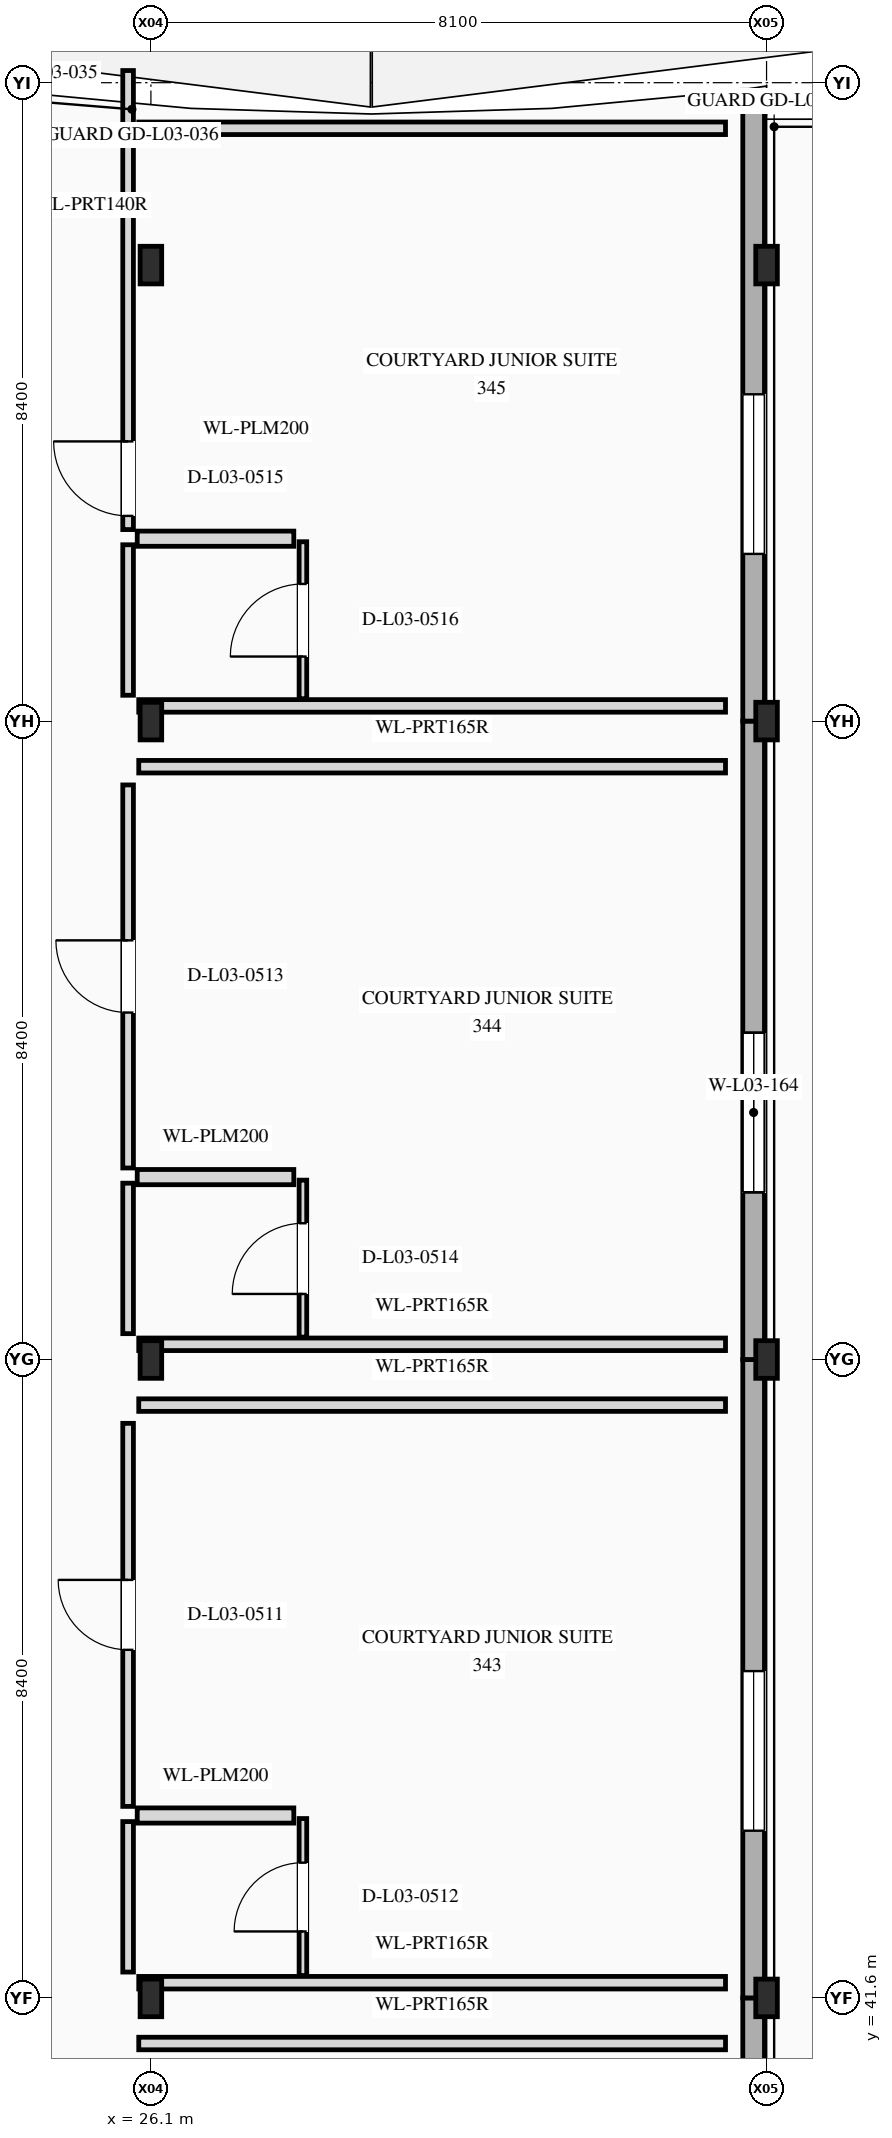
"""IFC4 building model, lengths in metres.
Left out: names, types, materials, properties, quantities, classifications, styles, units other than length and angle.
Written with IfcOpenShell. Run it as: python <this file> out.ifc"""

import sys

from ifc_helpers import new_model, si_unit, direction, frame, frame_2d, origin, origin_2d, place, context, subcontext, project, spatial, rectangle, i_section, extrude, element, fill, save


model = new_model("IFC4")
c1 = context("Model", 3, precision=1e-05, world=origin(), true_north=direction((0.0, 1.0)))
c2 = subcontext(c1, "Body", "Model", "MODEL_VIEW")
j1 = project(units=[si_unit("LENGTHUNIT", "METRE"), si_unit("PLANEANGLEUNIT", "RADIAN")], contexts=[c1])
p1 = place(None, origin())
s1 = spatial("IfcSite", under=j1, at=p1, CompositionType="ELEMENT")
p2 = place(p1, origin())
s2 = spatial("IfcBuilding", under=s1, at=p2, CompositionType="ELEMENT")
p3 = place(p2, frame((0.0, 0.0, 15.6)))
s3 = spatial("IfcBuildingStorey", under=s2, at=p3, CompositionType="ELEMENT", Elevation=15.6)
for number, where, z_axis, x_axis in (
    (1, (26.1, 41.6, -0.3), (0.0, 0.0, 1.0), (1.0, 0.0, 0.0)),
    (2, (34.2, 41.6, -0.3), (0.0, 0.0, 1.0), (1.0, 0.0, 0.0)),
    (3, (26.1, 50.0, -0.3), (0.0, 0.0, 1.0), (1.0, 0.0, 0.0)),
    (4, (34.2, 50.0, -0.3), (0.0, 0.0, 1.0), (1.0, 0.0, 0.0)),
    (5, (26.1, 58.4, -0.3), (0.0, 0.0, 1.0), (1.0, 0.0, 0.0)),
    (6, (34.2, 58.4, -0.3), (0.0, 0.0, 1.0), (1.0, 0.0, 0.0)),
    (7, (26.1, 64.4, -0.3), (0.0, 0.0, 1.0), (1.0, 0.0, 0.0)),
    (8, (34.2, 64.4, -0.3), (0.0, 0.0, 1.0), (1.0, 0.0, 0.0)),
):
    element("IfcColumn", number, at=place(p3, frame(where, z_axis=z_axis, x_axis=x_axis)), inside=s3, PredefinedType="COLUMN", context=c2, shape_type="SweptSolid", body=[
        extrude(i_section(OverallWidth=0.284, OverallDepth=0.495, WebThickness=0.019, FlangeThickness=0.033, at=origin_2d()), origin(), (0.0, 0.0, 1.0), 3.925),
    ])
p4 = place(p3, frame((34.03, 32.8, 0.0), z_axis=(0.0, 0.0, 1.0), x_axis=(0.0, 1.0, 0.0)))
e9 = element("IfcWall", 9, at=p4, inside=s3, PredefinedType="STANDARD", context=c2, shape_type="SweptSolid", body=[
    extrude(rectangle(XDim=8.8, YDim=0.285, at=frame_2d((4.4, 0.0))), origin(), (0.0, 0.0, 1.0), 3.9),
])
p5 = place(p4, frame((2.2, 0.0, 0.88)))
e10 = element("IfcOpeningElement", 10, at=p5, cuts=e9, PredefinedType="OPENING", context=c2, shape_type="SweptSolid", body=[
    extrude(rectangle(XDim=2.1, YDim=1.9, at=frame_2d((1.05, 0.95))), frame((0.0, 0.152, 0.0), z_axis=(0.0, -1.0, 0.0), x_axis=(1.0, 0.0, 0.0)), (0.0, 0.0, 1.0), 0.305),
])
p6 = place(p3, frame((34.03, 41.6, 0.0), z_axis=(0.0, 0.0, 1.0), x_axis=(0.0, 1.0, 0.0)))
e11 = element("IfcWall", 11, at=p6, inside=s3, PredefinedType="STANDARD", context=c2, shape_type="SweptSolid", body=[
    extrude(rectangle(XDim=8.4, YDim=0.285, at=frame_2d((4.2, 0.0))), origin(), (0.0, 0.0, 1.0), 3.9),
])
p7 = place(p6, frame((2.2, 0.0, 0.88)))
e12 = element("IfcOpeningElement", 12, at=p7, cuts=e11, PredefinedType="OPENING", context=c2, shape_type="SweptSolid", body=[
    extrude(rectangle(XDim=2.1, YDim=1.9, at=frame_2d((1.05, 0.95))), frame((0.0, 0.152, 0.0), z_axis=(0.0, -1.0, 0.0), x_axis=(1.0, 0.0, 0.0)), (0.0, 0.0, 1.0), 0.305),
])
p8 = place(p3, frame((34.03, 50.0, 0.0), z_axis=(0.0, 0.0, 1.0), x_axis=(0.0, 1.0, 0.0)))
e13 = element("IfcWall", 13, at=p8, inside=s3, PredefinedType="STANDARD", context=c2, shape_type="SweptSolid", body=[
    extrude(rectangle(XDim=8.4, YDim=0.285, at=frame_2d((4.2, 0.0))), origin(), (0.0, 0.0, 1.0), 3.9),
])
p9 = place(p8, frame((2.2, 0.0, 0.88)))
e14 = element("IfcOpeningElement", 14, at=p9, cuts=e13, PredefinedType="OPENING", context=c2, shape_type="SweptSolid", body=[
    extrude(rectangle(XDim=2.1, YDim=1.9, at=frame_2d((1.05, 0.95))), frame((0.0, 0.152, 0.0), z_axis=(0.0, -1.0, 0.0), x_axis=(1.0, 0.0, 0.0)), (0.0, 0.0, 1.0), 0.305),
])
p10 = place(p3, frame((34.03, 58.4, 0.0), z_axis=(0.0, 0.0, 1.0), x_axis=(0.0, 1.0, 0.0)))
e15 = element("IfcWall", 15, at=p10, inside=s3, PredefinedType="STANDARD", context=c2, shape_type="SweptSolid", body=[
    extrude(rectangle(XDim=8.3, YDim=0.285, at=frame_2d((4.15, 0.0))), origin(), (0.0, 0.0, 1.0), 3.9),
])
p11 = place(p10, frame((2.2, 0.0, 0.88)))
e16 = element("IfcOpeningElement", 16, at=p11, cuts=e15, PredefinedType="OPENING", context=c2, shape_type="SweptSolid", body=[
    extrude(rectangle(XDim=2.1, YDim=1.9, at=frame_2d((1.05, 0.95))), frame((0.0, 0.152, 0.0), z_axis=(0.0, -1.0, 0.0), x_axis=(1.0, 0.0, 0.0)), (0.0, 0.0, 1.0), 0.305),
])
p12 = place(p3, frame((25.94, 41.0, 0.0), z_axis=(0.0, 0.0, 1.0), x_axis=(1.0, 0.0, 0.0)))
e17 = element("IfcWall", 17, at=p12, inside=s3, PredefinedType="PARTITIONING", context=c2, shape_type="SweptSolid", body=[
    extrude(rectangle(XDim=7.72, YDim=0.165, at=frame_2d((3.86, 0.0))), origin(), (0.0, 0.0, 1.0), 3.074),
])
p13 = place(p3, frame((25.8, 41.94, 0.0), z_axis=(0.0, 0.0, 1.0), x_axis=(0.0, 1.0, 0.0)))
e18 = element("IfcWall", 18, at=p13, inside=s3, PredefinedType="PARTITIONING", context=c2, shape_type="SweptSolid", body=[
    extrude(rectangle(XDim=1.98, YDim=0.14, at=frame_2d((0.99, 0.0))), origin(), (0.0, 0.0, 1.0), 3.6),
])
p14 = place(p3, frame((25.8, 44.12, 0.0), z_axis=(0.0, 0.0, 1.0), x_axis=(0.0, 1.0, 0.0)))
e19 = element("IfcWall", 19, at=p14, inside=s3, PredefinedType="PARTITIONING", context=c2, shape_type="SweptSolid", body=[
    extrude(rectangle(XDim=5.04, YDim=0.14, at=frame_2d((2.52, 0.0))), origin(), (0.0, 0.0, 1.0), 3.074),
])
p15 = place(p14, frame((2.06, 0.0, 0.0)))
e20 = element("IfcOpeningElement", 20, at=p15, cuts=e19, PredefinedType="OPENING", context=c2, shape_type="SweptSolid", body=[
    extrude(rectangle(XDim=0.92, YDim=2.15, at=frame_2d((0.46, 1.075))), frame((0.0, 0.08, 0.0), z_axis=(0.0, -1.0, 0.0), x_axis=(1.0, 0.0, 0.0)), (0.0, 0.0, 1.0), 0.16),
])
p16 = place(p3, frame((25.94, 41.8, 0.0), z_axis=(0.0, 0.0, 1.0), x_axis=(1.0, 0.0, 0.0)))
e21 = element("IfcWall", 21, at=p16, inside=s3, PredefinedType="PARTITIONING", context=c2, shape_type="SweptSolid", body=[
    extrude(rectangle(XDim=7.72, YDim=0.165, at=frame_2d((3.86, 0.0))), origin(), (0.0, 0.0, 1.0), 2.584),
])
p17 = place(p3, frame((25.94, 49.4, 0.0), z_axis=(0.0, 0.0, 1.0), x_axis=(1.0, 0.0, 0.0)))
e22 = element("IfcWall", 22, at=p17, inside=s3, PredefinedType="PARTITIONING", context=c2, shape_type="SweptSolid", body=[
    extrude(rectangle(XDim=7.72, YDim=0.165, at=frame_2d((3.86, 0.0))), origin(), (0.0, 0.0, 1.0), 3.074),
])
p18 = place(p3, frame((25.92, 44.0, 0.0), z_axis=(0.0, 0.0, 1.0), x_axis=(1.0, 0.0, 0.0)))
e23 = element("IfcWall", 23, at=p18, inside=s3, PredefinedType="PLUMBINGWALL", context=c2, shape_type="SweptSolid", body=[
    extrude(rectangle(XDim=2.06, YDim=0.2, at=frame_2d((1.03, 0.0))), origin(), (0.0, 0.0, 1.0), 3.074),
])
p19 = place(p3, frame((28.1, 41.895, 0.0), z_axis=(0.0, 0.0, 1.0), x_axis=(0.0, 1.0, 0.0)))
e24 = element("IfcWall", 24, at=p19, inside=s3, PredefinedType="PARTITIONING", context=c2, shape_type="SweptSolid", body=[
    extrude(rectangle(XDim=2.065, YDim=0.1, at=frame_2d((1.033, 0.0))), origin(), (0.0, 0.0, 1.0), 3.6),
])
p20 = place(p19, frame((0.58, 0.0, 0.0)))
e25 = element("IfcOpeningElement", 25, at=p20, cuts=e24, PredefinedType="OPENING", context=c2, shape_type="SweptSolid", body=[
    extrude(rectangle(XDim=0.905, YDim=2.18, at=frame_2d((0.453, 1.09))), frame((0.0, 0.06, 0.0), z_axis=(0.0, -1.0, 0.0), x_axis=(1.0, 0.0, 0.0)), (0.0, 0.0, 1.0), 0.12),
])
p21 = place(p3, frame((25.8, 50.34, 0.0), z_axis=(0.0, 0.0, 1.0), x_axis=(0.0, 1.0, 0.0)))
e26 = element("IfcWall", 26, at=p21, inside=s3, PredefinedType="PARTITIONING", context=c2, shape_type="SweptSolid", body=[
    extrude(rectangle(XDim=1.98, YDim=0.14, at=frame_2d((0.99, 0.0))), origin(), (0.0, 0.0, 1.0), 3.6),
])
p22 = place(p3, frame((25.8, 52.52, 0.0), z_axis=(0.0, 0.0, 1.0), x_axis=(0.0, 1.0, 0.0)))
e27 = element("IfcWall", 27, at=p22, inside=s3, PredefinedType="PARTITIONING", context=c2, shape_type="SweptSolid", body=[
    extrude(rectangle(XDim=5.04, YDim=0.14, at=frame_2d((2.52, 0.0))), origin(), (0.0, 0.0, 1.0), 3.074),
])
p23 = place(p22, frame((2.045, 0.0, 0.0)))
e28 = element("IfcOpeningElement", 28, at=p23, cuts=e27, PredefinedType="OPENING", context=c2, shape_type="SweptSolid", body=[
    extrude(rectangle(XDim=0.95, YDim=2.15, at=frame_2d((0.475, 1.075))), frame((0.0, 0.08, 0.0), z_axis=(0.0, -1.0, 0.0), x_axis=(1.0, 0.0, 0.0)), (0.0, 0.0, 1.0), 0.16),
])
p24 = place(p3, frame((25.94, 50.2, 0.0), z_axis=(0.0, 0.0, 1.0), x_axis=(1.0, 0.0, 0.0)))
e29 = element("IfcWall", 29, at=p24, inside=s3, PredefinedType="PARTITIONING", context=c2, shape_type="SweptSolid", body=[
    extrude(rectangle(XDim=7.72, YDim=0.165, at=frame_2d((3.86, 0.0))), origin(), (0.0, 0.0, 1.0), 2.584),
])
p25 = place(p3, frame((25.94, 57.8, 0.0), z_axis=(0.0, 0.0, 1.0), x_axis=(1.0, 0.0, 0.0)))
e30 = element("IfcWall", 30, at=p25, inside=s3, PredefinedType="PARTITIONING", context=c2, shape_type="SweptSolid", body=[
    extrude(rectangle(XDim=7.72, YDim=0.165, at=frame_2d((3.86, 0.0))), origin(), (0.0, 0.0, 1.0), 3.074),
])
p26 = place(p3, frame((25.92, 52.4, 0.0), z_axis=(0.0, 0.0, 1.0), x_axis=(1.0, 0.0, 0.0)))
e31 = element("IfcWall", 31, at=p26, inside=s3, PredefinedType="PLUMBINGWALL", context=c2, shape_type="SweptSolid", body=[
    extrude(rectangle(XDim=2.06, YDim=0.2, at=frame_2d((1.03, 0.0))), origin(), (0.0, 0.0, 1.0), 3.074),
])
p27 = place(p3, frame((28.1, 50.294, 0.0), z_axis=(0.0, 0.0, 1.0), x_axis=(0.0, 1.0, 0.0)))
e32 = element("IfcWall", 32, at=p27, inside=s3, PredefinedType="PARTITIONING", context=c2, shape_type="SweptSolid", body=[
    extrude(rectangle(XDim=2.066, YDim=0.1, at=frame_2d((1.033, 0.0))), origin(), (0.0, 0.0, 1.0), 3.6),
])
p28 = place(p27, frame((0.568, 0.0, 0.0)))
e33 = element("IfcOpeningElement", 33, at=p28, cuts=e32, PredefinedType="OPENING", context=c2, shape_type="SweptSolid", body=[
    extrude(rectangle(XDim=0.93, YDim=2.22, at=frame_2d((0.465, 1.11))), frame((0.0, 0.06, 0.0), z_axis=(0.0, -1.0, 0.0), x_axis=(1.0, 0.0, 0.0)), (0.0, 0.0, 1.0), 0.12),
])
p29 = place(p3, frame((25.8, 58.74, 0.0), z_axis=(0.0, 0.0, 1.0), x_axis=(0.0, 1.0, 0.0)))
e34 = element("IfcWall", 34, at=p29, inside=s3, PredefinedType="PARTITIONING", context=c2, shape_type="SweptSolid", body=[
    extrude(rectangle(XDim=1.98, YDim=0.14, at=frame_2d((0.99, 0.0))), origin(), (0.0, 0.0, 1.0), 3.6),
])
p30 = place(p3, frame((25.8, 60.92, 0.0), z_axis=(0.0, 0.0, 1.0), x_axis=(0.0, 1.0, 0.0)))
e35 = element("IfcWall", 35, at=p30, inside=s3, PredefinedType="PARTITIONING", context=c2, shape_type="SweptSolid", body=[
    extrude(rectangle(XDim=6.04, YDim=0.14, at=frame_2d((3.02, 0.0))), origin(), (0.0, 0.0, 1.0), 2.584),
])
p31 = place(p30, frame((0.18, 0.0, 0.0)))
e36 = element("IfcOpeningElement", 36, at=p31, cuts=e35, PredefinedType="OPENING", context=c2, shape_type="SweptSolid", body=[
    extrude(rectangle(XDim=0.98, YDim=2.2, at=frame_2d((0.49, 1.1))), frame((0.0, 0.08, 0.0), z_axis=(0.0, -1.0, 0.0), x_axis=(1.0, 0.0, 0.0)), (0.0, 0.0, 1.0), 0.16),
])
p32 = place(p3, frame((25.94, 58.6, 0.0), z_axis=(0.0, 0.0, 1.0), x_axis=(1.0, 0.0, 0.0)))
e37 = element("IfcWall", 37, at=p32, inside=s3, PredefinedType="PARTITIONING", context=c2, shape_type="SweptSolid", body=[
    extrude(rectangle(XDim=7.72, YDim=0.165, at=frame_2d((3.86, 0.0))), origin(), (0.0, 0.0, 1.0), 2.584),
])
p33 = place(p3, frame((25.94, 66.2, 0.0), z_axis=(0.0, 0.0, 1.0), x_axis=(1.0, 0.0, 0.0)))
e38 = element("IfcWall", 38, at=p33, inside=s3, PredefinedType="PARTITIONING", context=c2, shape_type="SweptSolid", body=[
    extrude(rectangle(XDim=7.72, YDim=0.165, at=frame_2d((3.86, 0.0))), origin(), (0.0, 0.0, 1.0), 3.6),
])
p34 = place(p3, frame((25.92, 60.8, 0.0), z_axis=(0.0, 0.0, 1.0), x_axis=(1.0, 0.0, 0.0)))
e39 = element("IfcWall", 39, at=p34, inside=s3, PredefinedType="PLUMBINGWALL", context=c2, shape_type="SweptSolid", body=[
    extrude(rectangle(XDim=2.06, YDim=0.2, at=frame_2d((1.03, 0.0))), origin(), (0.0, 0.0, 1.0), 3.074),
])
p35 = place(p3, frame((28.1, 58.695, 0.0), z_axis=(0.0, 0.0, 1.0), x_axis=(0.0, 1.0, 0.0)))
e40 = element("IfcWall", 40, at=p35, inside=s3, PredefinedType="PARTITIONING", context=c2, shape_type="SweptSolid", body=[
    extrude(rectangle(XDim=2.065, YDim=0.1, at=frame_2d((1.033, 0.0))), origin(), (0.0, 0.0, 1.0), 3.6),
])
p36 = place(p35, frame((0.555, 0.0, 0.0)))
e41 = element("IfcOpeningElement", 41, at=p36, cuts=e40, PredefinedType="OPENING", context=c2, shape_type="SweptSolid", body=[
    extrude(rectangle(XDim=0.955, YDim=2.22, at=frame_2d((0.478, 1.11))), frame((0.0, 0.06, 0.0), z_axis=(0.0, -1.0, 0.0), x_axis=(1.0, 0.0, 0.0)), (0.0, 0.0, 1.0), 0.12),
])
p37 = place(p7, origin())
e42 = element("IfcWindow", 42, at=p37, inside=s3, PartitioningType="SINGLE_PANEL", PredefinedType="WINDOW", context=c2, shape_type="SweptSolid", body=[
    extrude(rectangle(XDim=2.1, YDim=1.9, at=frame_2d((1.05, 0.95))), frame((0.0, 0.03, 0.0), z_axis=(0.0, -1.0, 0.0), x_axis=(1.0, 0.0, 0.0)), (0.0, 0.0, 1.0), 0.06),
])
fill(e12, e42)
p38 = place(p9, origin())
e43 = element("IfcWindow", 43, at=p38, inside=s3, PartitioningType="SINGLE_PANEL", PredefinedType="WINDOW", context=c2, shape_type="SweptSolid", body=[
    extrude(rectangle(XDim=2.1, YDim=1.9, at=frame_2d((1.05, 0.95))), frame((0.0, 0.03, 0.0), z_axis=(0.0, -1.0, 0.0), x_axis=(1.0, 0.0, 0.0)), (0.0, 0.0, 1.0), 0.06),
])
fill(e14, e43)
p39 = place(p11, origin())
e44 = element("IfcWindow", 44, at=p39, inside=s3, PartitioningType="SINGLE_PANEL", PredefinedType="WINDOW", context=c2, shape_type="SweptSolid", body=[
    extrude(rectangle(XDim=2.1, YDim=1.9, at=frame_2d((1.05, 0.95))), frame((0.0, 0.03, 0.0), z_axis=(0.0, -1.0, 0.0), x_axis=(1.0, 0.0, 0.0)), (0.0, 0.0, 1.0), 0.06),
])
fill(e16, e44)
p40 = place(p15, origin())
e45 = element("IfcDoor", 45, at=p40, inside=s3, OperationType="SINGLE_SWING_RIGHT", PredefinedType="DOOR", context=c2, shape_type="SweptSolid", body=[
    extrude(rectangle(XDim=0.92, YDim=2.15, at=frame_2d((0.46, 1.075))), frame((0.0, 0.025, 0.0), z_axis=(0.0, -1.0, 0.0), x_axis=(1.0, 0.0, 0.0)), (0.0, 0.0, 1.0), 0.05),
])
fill(e20, e45)
p41 = place(p20, origin())
e46 = element("IfcDoor", 46, at=p41, inside=s3, OperationType="SINGLE_SWING_LEFT", PredefinedType="DOOR", context=c2, shape_type="SweptSolid", body=[
    extrude(rectangle(XDim=0.905, YDim=2.18, at=frame_2d((0.453, 1.09))), frame((0.0, 0.025, 0.0), z_axis=(0.0, -1.0, 0.0), x_axis=(1.0, 0.0, 0.0)), (0.0, 0.0, 1.0), 0.05),
])
fill(e25, e46)
p42 = place(p23, origin())
e47 = element("IfcDoor", 47, at=p42, inside=s3, OperationType="SINGLE_SWING_RIGHT", PredefinedType="DOOR", context=c2, shape_type="SweptSolid", body=[
    extrude(rectangle(XDim=0.95, YDim=2.15, at=frame_2d((0.475, 1.075))), frame((0.0, 0.025, 0.0), z_axis=(0.0, -1.0, 0.0), x_axis=(1.0, 0.0, 0.0)), (0.0, 0.0, 1.0), 0.05),
])
fill(e28, e47)
p43 = place(p28, origin())
e48 = element("IfcDoor", 48, at=p43, inside=s3, OperationType="SINGLE_SWING_LEFT", PredefinedType="DOOR", context=c2, shape_type="SweptSolid", body=[
    extrude(rectangle(XDim=0.93, YDim=2.22, at=frame_2d((0.465, 1.11))), frame((0.0, 0.025, 0.0), z_axis=(0.0, -1.0, 0.0), x_axis=(1.0, 0.0, 0.0)), (0.0, 0.0, 1.0), 0.05),
])
fill(e33, e48)
p44 = place(p31, origin())
e49 = element("IfcDoor", 49, at=p44, inside=s3, OperationType="SINGLE_SWING_RIGHT", PredefinedType="DOOR", context=c2, shape_type="SweptSolid", body=[
    extrude(rectangle(XDim=0.98, YDim=2.2, at=frame_2d((0.49, 1.1))), frame((0.0, 0.025, 0.0), z_axis=(0.0, -1.0, 0.0), x_axis=(1.0, 0.0, 0.0)), (0.0, 0.0, 1.0), 0.05),
])
fill(e36, e49)
p45 = place(p36, origin())
e50 = element("IfcDoor", 50, at=p45, inside=s3, OperationType="SINGLE_SWING_LEFT", PredefinedType="DOOR", context=c2, shape_type="SweptSolid", body=[
    extrude(rectangle(XDim=0.955, YDim=2.22, at=frame_2d((0.478, 1.11))), frame((0.0, 0.025, 0.0), z_axis=(0.0, -1.0, 0.0), x_axis=(1.0, 0.0, 0.0)), (0.0, 0.0, 1.0), 0.05),
])
fill(e41, e50)
save(model, sys.argv[1])
